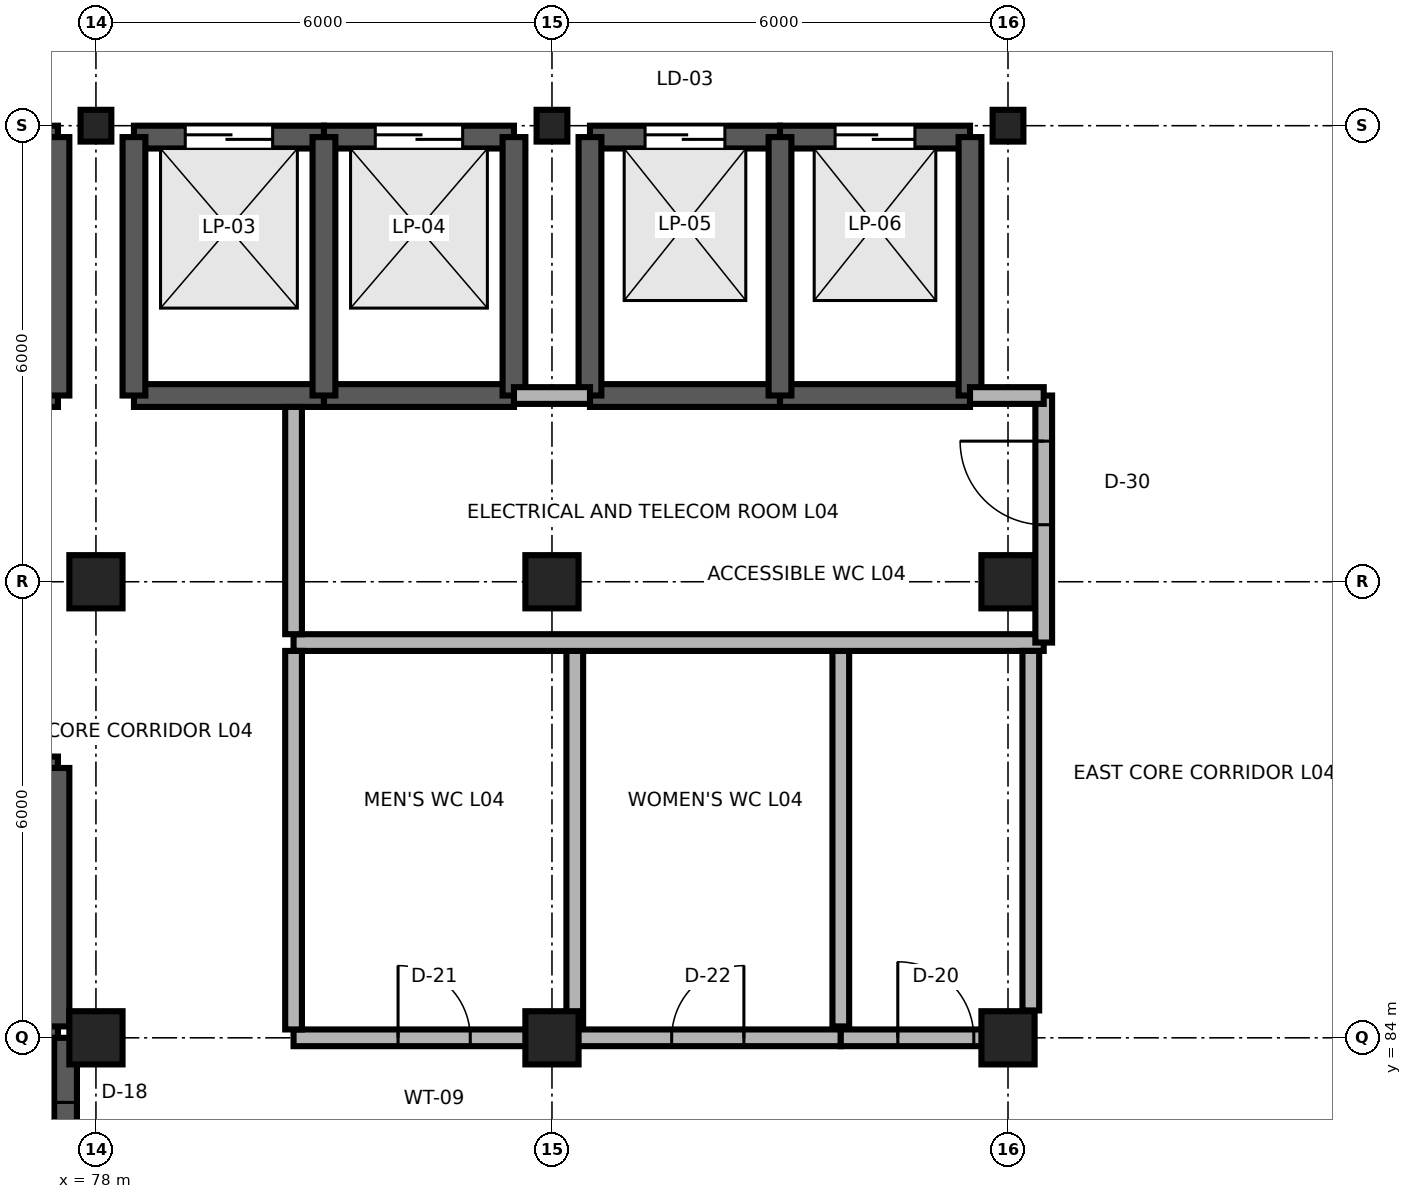
"""IFC4 building model, lengths in metres.
Left out: names, types, materials, properties, quantities, classifications, styles, units other than length and angle.
Written with IfcOpenShell. Run it as: python <this file> out.ifc"""

import sys

from ifc_helpers import new_model, si_unit, direction, frame, frame_2d, origin, origin_2d, place, context, subcontext, project, spatial, rectangle, i_section, extrude, element, fill, save


model = new_model("IFC4")
c1 = context("Model", 3, precision=1e-05, world=origin(), true_north=direction((0.0, 1.0)))
c2 = subcontext(c1, "Body", "Model", "MODEL_VIEW")
j1 = project(units=[si_unit("LENGTHUNIT", "METRE"), si_unit("PLANEANGLEUNIT", "RADIAN")], contexts=[c1])
p1 = place(None, origin())
s1 = spatial("IfcSite", under=j1, at=p1, CompositionType="ELEMENT")
p2 = place(p1, origin())
s2 = spatial("IfcBuilding", under=s1, at=p2, CompositionType="ELEMENT")
p3 = place(p2, frame((0.0, 0.0, 16.5)))
s3 = spatial("IfcBuildingStorey", under=s2, at=p3, CompositionType="ELEMENT", Elevation=16.5)
for number, where, z_axis, x_axis in (
    (1, (78.0, 84.0, 0.0), (0.0, 0.0, 1.0), (1.0, 0.0, 0.0)),
    (2, (84.0, 84.0, 0.0), (0.0, 0.0, 1.0), (1.0, 0.0, 0.0)),
    (3, (90.0, 84.0, 0.0), (0.0, 0.0, 1.0), (1.0, 0.0, 0.0)),
    (4, (78.0, 90.0, 0.0), (0.0, 0.0, 1.0), (1.0, 0.0, 0.0)),
    (5, (84.0, 90.0, 0.0), (0.0, 0.0, 1.0), (1.0, 0.0, 0.0)),
    (6, (90.0, 90.0, 0.0), (0.0, 0.0, 1.0), (1.0, 0.0, 0.0)),
):
    element("IfcColumn", number, at=place(p3, frame(where, z_axis=z_axis, x_axis=x_axis)), inside=s3, PredefinedType="COLUMN", context=c2, shape_type="SweptSolid", body=[
        extrude(rectangle(XDim=0.7, YDim=0.7, at=origin_2d()), origin(), (0.0, 0.0, 1.0), 4.5),
    ])
for number, where, z_axis, x_axis in (
    (7, (78.0, 96.0, 0.0), (0.0, 0.0, 1.0), (1.0, 0.0, 0.0)),
    (8, (84.0, 96.0, 0.0), (0.0, 0.0, 1.0), (1.0, 0.0, 0.0)),
    (9, (90.0, 96.0, 0.0), (0.0, 0.0, 1.0), (1.0, 0.0, 0.0)),
):
    element("IfcColumn", number, at=place(p3, frame(where, z_axis=z_axis, x_axis=x_axis)), inside=s3, PredefinedType="COLUMN", context=c2, shape_type="SweptSolid", body=[
        extrude(i_section(OverallWidth=0.405, OverallDepth=0.418, WebThickness=0.02, FlangeThickness=0.03, FilletRadius=0.022, at=origin_2d()), origin(), (0.0, 0.0, 1.0), 4.5),
    ])
p4 = place(p3, frame((75.0, 84.15, 0.0), z_axis=(0.0, 0.0, 1.0), x_axis=(1.0, 0.0, 0.0)))
e10 = element("IfcWall", 10, at=p4, inside=s3, PredefinedType="SHEAR", context=c2, shape_type="SweptSolid", body=[
    extrude(rectangle(XDim=2.5, YDim=0.3, at=frame_2d((1.25, 0.0))), origin(), (0.0, 0.0, 1.0), 4.34),
])
p5 = place(p4, frame((0.7, 0.0, 0.0)))
e11 = element("IfcOpeningElement", 11, at=p5, cuts=e10, PredefinedType="OPENING", context=c2, shape_type="SweptSolid", body=[
    extrude(rectangle(XDim=1.1, YDim=2.1, at=frame_2d((0.55, 1.05))), frame((0.0, 0.165, 0.0), z_axis=(0.0, -1.0, 0.0), x_axis=(1.0, 0.0, 0.0)), (0.0, 0.0, 1.0), 0.33),
])
p6 = place(p3, frame((75.0, 87.55, 0.0), z_axis=(0.0, 0.0, 1.0), x_axis=(1.0, 0.0, 0.0)))
e12 = element("IfcWall", 12, at=p6, inside=s3, PredefinedType="SHEAR", context=c2, shape_type="SweptSolid", body=[
    extrude(rectangle(XDim=2.5, YDim=0.3, at=frame_2d((1.25, 0.0))), origin(), (0.0, 0.0, 1.0), 4.34),
])
p7 = place(p3, frame((77.5, 84.15, 0.0), z_axis=(0.0, 0.0, 1.0), x_axis=(0.0, 1.0, 0.0)))
e13 = element("IfcWall", 13, at=p7, inside=s3, PredefinedType="SHEAR", context=c2, shape_type="SweptSolid", body=[
    extrude(rectangle(XDim=3.4, YDim=0.3, at=frame_2d((1.7, 0.0))), origin(), (0.0, 0.0, 1.0), 4.34),
])
p8 = place(p3, frame((75.0, 95.85, 0.0), z_axis=(0.0, 0.0, 1.0), x_axis=(1.0, 0.0, 0.0)))
e14 = element("IfcWall", 14, at=p8, inside=s3, PredefinedType="SHEAR", context=c2, shape_type="SweptSolid", body=[
    extrude(rectangle(XDim=2.5, YDim=0.3, at=frame_2d((1.25, 0.0))), origin(), (0.0, 0.0, 1.0), 4.34),
])
p9 = place(p8, frame((0.675, 0.0, 0.0)))
e15 = element("IfcOpeningElement", 15, at=p9, cuts=e14, PredefinedType="OPENING", context=c2, shape_type="SweptSolid", body=[
    extrude(rectangle(XDim=1.15, YDim=2.15, at=frame_2d((0.575, 1.075))), frame((0.0, 0.165, 0.0), z_axis=(0.0, -1.0, 0.0), x_axis=(1.0, 0.0, 0.0)), (0.0, 0.0, 1.0), 0.33),
])
p10 = place(p3, frame((75.0, 92.45, 0.0), z_axis=(0.0, 0.0, 1.0), x_axis=(1.0, 0.0, 0.0)))
e16 = element("IfcWall", 16, at=p10, inside=s3, PredefinedType="SHEAR", context=c2, shape_type="SweptSolid", body=[
    extrude(rectangle(XDim=2.5, YDim=0.3, at=frame_2d((1.25, 0.0))), origin(), (0.0, 0.0, 1.0), 4.34),
])
p11 = place(p3, frame((77.5, 92.45, 0.0), z_axis=(0.0, 0.0, 1.0), x_axis=(0.0, 1.0, 0.0)))
e17 = element("IfcWall", 17, at=p11, inside=s3, PredefinedType="SHEAR", context=c2, shape_type="SweptSolid", body=[
    extrude(rectangle(XDim=3.4, YDim=0.3, at=frame_2d((1.7, 0.0))), origin(), (0.0, 0.0, 1.0), 4.34),
])
p12 = place(p3, frame((78.5, 95.85, 0.0), z_axis=(0.0, 0.0, 1.0), x_axis=(1.0, 0.0, 0.0)))
e18 = element("IfcWall", 18, at=p12, inside=s3, PredefinedType="SHEAR", context=c2, shape_type="SweptSolid", body=[
    extrude(rectangle(XDim=2.5, YDim=0.3, at=frame_2d((1.25, 0.0))), origin(), (0.0, 0.0, 1.0), 4.34),
])
p13 = place(p12, frame((0.675, 0.0, 0.0)))
e19 = element("IfcOpeningElement", 19, at=p13, cuts=e18, PredefinedType="OPENING", context=c2, shape_type="SweptSolid", body=[
    extrude(rectangle(XDim=1.15, YDim=2.15, at=frame_2d((0.575, 1.075))), frame((0.0, 0.165, 0.0), z_axis=(0.0, -1.0, 0.0), x_axis=(1.0, 0.0, 0.0)), (0.0, 0.0, 1.0), 0.33),
])
p14 = place(p3, frame((78.5, 92.45, 0.0), z_axis=(0.0, 0.0, 1.0), x_axis=(1.0, 0.0, 0.0)))
e20 = element("IfcWall", 20, at=p14, inside=s3, PredefinedType="SHEAR", context=c2, shape_type="SweptSolid", body=[
    extrude(rectangle(XDim=2.5, YDim=0.3, at=frame_2d((1.25, 0.0))), origin(), (0.0, 0.0, 1.0), 4.34),
])
p15 = place(p3, frame((78.5, 92.45, 0.0), z_axis=(0.0, 0.0, 1.0), x_axis=(0.0, 1.0, 0.0)))
e21 = element("IfcWall", 21, at=p15, inside=s3, PredefinedType="SHEAR", context=c2, shape_type="SweptSolid", body=[
    extrude(rectangle(XDim=3.4, YDim=0.3, at=frame_2d((1.7, 0.0))), origin(), (0.0, 0.0, 1.0), 4.34),
])
p16 = place(p3, frame((81.0, 95.85, 0.0), z_axis=(0.0, 0.0, 1.0), x_axis=(1.0, 0.0, 0.0)))
e22 = element("IfcWall", 22, at=p16, inside=s3, PredefinedType="SHEAR", context=c2, shape_type="SweptSolid", body=[
    extrude(rectangle(XDim=2.5, YDim=0.3, at=frame_2d((1.25, 0.0))), origin(), (0.0, 0.0, 1.0), 4.34),
])
p17 = place(p16, frame((0.675, 0.0, 0.0)))
e23 = element("IfcOpeningElement", 23, at=p17, cuts=e22, PredefinedType="OPENING", context=c2, shape_type="SweptSolid", body=[
    extrude(rectangle(XDim=1.15, YDim=2.15, at=frame_2d((0.575, 1.075))), frame((0.0, 0.165, 0.0), z_axis=(0.0, -1.0, 0.0), x_axis=(1.0, 0.0, 0.0)), (0.0, 0.0, 1.0), 0.33),
])
p18 = place(p3, frame((81.0, 92.45, 0.0), z_axis=(0.0, 0.0, 1.0), x_axis=(1.0, 0.0, 0.0)))
e24 = element("IfcWall", 24, at=p18, inside=s3, PredefinedType="SHEAR", context=c2, shape_type="SweptSolid", body=[
    extrude(rectangle(XDim=2.5, YDim=0.3, at=frame_2d((1.25, 0.0))), origin(), (0.0, 0.0, 1.0), 4.34),
])
for number, where, z_axis, x_axis in (
    (25, (81.0, 92.45, 0.0), (0.0, 0.0, 1.0), (0.0, 1.0, 0.0)),
    (26, (83.5, 92.45, 0.0), (0.0, 0.0, 1.0), (0.0, 1.0, 0.0)),
):
    element("IfcWall", number, at=place(p3, frame(where, z_axis=z_axis, x_axis=x_axis)), inside=s3, PredefinedType="SHEAR", context=c2, shape_type="SweptSolid", body=[
        extrude(rectangle(XDim=3.4, YDim=0.3, at=frame_2d((1.7, 0.0))), origin(), (0.0, 0.0, 1.0), 4.34),
    ])
p19 = place(p3, frame((84.5, 95.85, 0.0), z_axis=(0.0, 0.0, 1.0), x_axis=(1.0, 0.0, 0.0)))
e27 = element("IfcWall", 27, at=p19, inside=s3, PredefinedType="SHEAR", context=c2, shape_type="SweptSolid", body=[
    extrude(rectangle(XDim=2.5, YDim=0.3, at=frame_2d((1.25, 0.0))), origin(), (0.0, 0.0, 1.0), 4.34),
])
p20 = place(p19, frame((0.725, 0.0, 0.0)))
e28 = element("IfcOpeningElement", 28, at=p20, cuts=e27, PredefinedType="OPENING", context=c2, shape_type="SweptSolid", body=[
    extrude(rectangle(XDim=1.05, YDim=2.1, at=frame_2d((0.525, 1.05))), frame((0.0, 0.165, 0.0), z_axis=(0.0, -1.0, 0.0), x_axis=(1.0, 0.0, 0.0)), (0.0, 0.0, 1.0), 0.33),
])
p21 = place(p3, frame((84.5, 92.45, 0.0), z_axis=(0.0, 0.0, 1.0), x_axis=(1.0, 0.0, 0.0)))
e29 = element("IfcWall", 29, at=p21, inside=s3, PredefinedType="SHEAR", context=c2, shape_type="SweptSolid", body=[
    extrude(rectangle(XDim=2.5, YDim=0.3, at=frame_2d((1.25, 0.0))), origin(), (0.0, 0.0, 1.0), 4.34),
])
p22 = place(p3, frame((84.5, 92.45, 0.0), z_axis=(0.0, 0.0, 1.0), x_axis=(0.0, 1.0, 0.0)))
e30 = element("IfcWall", 30, at=p22, inside=s3, PredefinedType="SHEAR", context=c2, shape_type="SweptSolid", body=[
    extrude(rectangle(XDim=3.4, YDim=0.3, at=frame_2d((1.7, 0.0))), origin(), (0.0, 0.0, 1.0), 4.34),
])
p23 = place(p3, frame((87.0, 95.85, 0.0), z_axis=(0.0, 0.0, 1.0), x_axis=(1.0, 0.0, 0.0)))
e31 = element("IfcWall", 31, at=p23, inside=s3, PredefinedType="SHEAR", context=c2, shape_type="SweptSolid", body=[
    extrude(rectangle(XDim=2.5, YDim=0.3, at=frame_2d((1.25, 0.0))), origin(), (0.0, 0.0, 1.0), 4.34),
])
p24 = place(p23, frame((0.725, 0.0, 0.0)))
e32 = element("IfcOpeningElement", 32, at=p24, cuts=e31, PredefinedType="OPENING", context=c2, shape_type="SweptSolid", body=[
    extrude(rectangle(XDim=1.05, YDim=2.1, at=frame_2d((0.525, 1.05))), frame((0.0, 0.165, 0.0), z_axis=(0.0, -1.0, 0.0), x_axis=(1.0, 0.0, 0.0)), (0.0, 0.0, 1.0), 0.33),
])
p25 = place(p3, frame((87.0, 92.45, 0.0), z_axis=(0.0, 0.0, 1.0), x_axis=(1.0, 0.0, 0.0)))
e33 = element("IfcWall", 33, at=p25, inside=s3, PredefinedType="SHEAR", context=c2, shape_type="SweptSolid", body=[
    extrude(rectangle(XDim=2.5, YDim=0.3, at=frame_2d((1.25, 0.0))), origin(), (0.0, 0.0, 1.0), 4.34),
])
for number, where, z_axis, x_axis in (
    (34, (87.0, 92.45, 0.0), (0.0, 0.0, 1.0), (0.0, 1.0, 0.0)),
    (35, (89.5, 92.45, 0.0), (0.0, 0.0, 1.0), (0.0, 1.0, 0.0)),
):
    element("IfcWall", number, at=place(p3, frame(where, z_axis=z_axis, x_axis=x_axis)), inside=s3, PredefinedType="SHEAR", context=c2, shape_type="SweptSolid", body=[
        extrude(rectangle(XDim=3.4, YDim=0.3, at=frame_2d((1.7, 0.0))), origin(), (0.0, 0.0, 1.0), 4.34),
    ])
p26 = place(p3, frame((77.6, 81.0, 0.0), z_axis=(0.0, 0.0, 1.0), x_axis=(0.0, 1.0, 0.0)))
e36 = element("IfcWall", 36, at=p26, inside=s3, PredefinedType="SHEAR", context=c2, shape_type="SweptSolid", body=[
    extrude(rectangle(XDim=3.0, YDim=0.3, at=frame_2d((1.5, 0.0))), origin(), (0.0, 0.0, 1.0), 4.0),
])
p27 = place(p26, frame((0.85, 0.0, 0.0)))
e37 = element("IfcOpeningElement", 37, at=p27, cuts=e36, PredefinedType="OPENING", context=c2, shape_type="SweptSolid", body=[
    extrude(rectangle(XDim=1.3, YDim=2.2, at=frame_2d((0.65, 1.1))), frame((0.0, 0.165, 0.0), z_axis=(0.0, -1.0, 0.0), x_axis=(1.0, 0.0, 0.0)), (0.0, 0.0, 1.0), 0.33),
])
p28 = place(p3, frame((80.6, 84.0, 0.0), z_axis=(0.0, 0.0, 1.0), x_axis=(1.0, 0.0, 0.0)))
e38 = element("IfcWall", 38, at=p28, inside=s3, PredefinedType="PARTITIONING", context=c2, shape_type="SweptSolid", body=[
    extrude(rectangle(XDim=3.7, YDim=0.22, at=frame_2d((1.85, 0.0))), origin(), (0.0, 0.0, 1.0), 3.9),
])
p29 = place(p28, frame((1.375, 0.0, 0.0)))
e39 = element("IfcOpeningElement", 39, at=p29, cuts=e38, PredefinedType="OPENING", context=c2, shape_type="SweptSolid", body=[
    extrude(rectangle(XDim=0.95, YDim=2.15, at=frame_2d((0.475, 1.075))), frame((0.0, 0.125, 0.0), z_axis=(0.0, -1.0, 0.0), x_axis=(1.0, 0.0, 0.0)), (0.0, 0.0, 1.0), 0.25),
])
p30 = place(p3, frame((84.3, 84.0, 0.0), z_axis=(0.0, 0.0, 1.0), x_axis=(1.0, 0.0, 0.0)))
e40 = element("IfcWall", 40, at=p30, inside=s3, PredefinedType="PARTITIONING", context=c2, shape_type="SweptSolid", body=[
    extrude(rectangle(XDim=3.5, YDim=0.22, at=frame_2d((1.75, 0.0))), origin(), (0.0, 0.0, 1.0), 3.9),
])
p31 = place(p30, frame((1.275, 0.0, 0.0)))
e41 = element("IfcOpeningElement", 41, at=p31, cuts=e40, PredefinedType="OPENING", context=c2, shape_type="SweptSolid", body=[
    extrude(rectangle(XDim=0.95, YDim=2.1, at=frame_2d((0.475, 1.05))), frame((0.0, 0.125, 0.0), z_axis=(0.0, -1.0, 0.0), x_axis=(1.0, 0.0, 0.0)), (0.0, 0.0, 1.0), 0.25),
])
p32 = place(p3, frame((87.8, 84.0, 0.0), z_axis=(0.0, 0.0, 1.0), x_axis=(1.0, 0.0, 0.0)))
e42 = element("IfcWall", 42, at=p32, inside=s3, PredefinedType="PARTITIONING", context=c2, shape_type="SweptSolid", body=[
    extrude(rectangle(XDim=2.5, YDim=0.22, at=frame_2d((1.25, 0.0))), origin(), (0.0, 0.0, 1.0), 3.9),
])
p33 = place(p32, frame((0.75, 0.0, 0.0)))
e43 = element("IfcOpeningElement", 43, at=p33, cuts=e42, PredefinedType="OPENING", context=c2, shape_type="SweptSolid", body=[
    extrude(rectangle(XDim=1.0, YDim=2.15, at=frame_2d((0.5, 1.075))), frame((0.0, 0.125, 0.0), z_axis=(0.0, -1.0, 0.0), x_axis=(1.0, 0.0, 0.0)), (0.0, 0.0, 1.0), 0.25),
])
for number, where, z_axis, x_axis in (
    (44, (84.3, 84.15, 0.0), (0.0, 0.0, 1.0), (0.0, 1.0, 0.0)),
    (45, (87.8, 84.15, 0.0), (0.0, 0.0, 1.0), (0.0, 1.0, 0.0)),
):
    element("IfcWall", number, at=place(p3, frame(where, z_axis=z_axis, x_axis=x_axis)), inside=s3, PredefinedType="PARTITIONING", context=c2, shape_type="SweptSolid", body=[
        extrude(rectangle(XDim=5.0, YDim=0.22, at=frame_2d((2.5, 0.0))), origin(), (0.0, 0.0, 1.0), 4.0),
    ])
p34 = place(p3, frame((80.6, 89.2, 0.0), z_axis=(0.0, 0.0, 1.0), x_axis=(1.0, 0.0, 0.0)))
e46 = element("IfcWall", 46, at=p34, inside=s3, PredefinedType="PARTITIONING", context=c2, shape_type="SweptSolid", body=[
    extrude(rectangle(XDim=9.87, YDim=0.22, at=frame_2d((4.935, 0.0))), origin(), (0.0, 0.0, 1.0), 4.0),
])
p35 = place(p3, frame((90.47, 89.2, 0.0), z_axis=(0.0, 0.0, 1.0), x_axis=(0.0, 1.0, 0.0)))
e47 = element("IfcWall", 47, at=p35, inside=s3, PredefinedType="PARTITIONING", context=c2, shape_type="SweptSolid", body=[
    extrude(rectangle(XDim=3.25, YDim=0.22, at=frame_2d((1.625, 0.0))), origin(), (0.0, 0.0, 1.0), 4.0),
])
p36 = place(p35, frame((1.55, 0.0, 0.0)))
e48 = element("IfcOpeningElement", 48, at=p36, cuts=e47, PredefinedType="OPENING", context=c2, shape_type="SweptSolid", body=[
    extrude(rectangle(XDim=1.1, YDim=2.15, at=frame_2d((0.55, 1.075))), frame((0.0, 0.125, 0.0), z_axis=(0.0, -1.0, 0.0), x_axis=(1.0, 0.0, 0.0)), (0.0, 0.0, 1.0), 0.25),
])
p37 = place(p3, frame((80.6, 84.11, 0.0), z_axis=(0.0, 0.0, 1.0), x_axis=(0.0, 1.0, 0.0)))
e49 = element("IfcWall", 49, at=p37, inside=s3, PredefinedType="PARTITIONING", context=c2, shape_type="SweptSolid", body=[
    extrude(rectangle(XDim=4.98, YDim=0.22, at=frame_2d((2.49, 0.0))), origin(), (0.0, 0.0, 1.0), 4.0),
])
p38 = place(p3, frame((90.3, 84.36, 0.0), z_axis=(0.0, 0.0, 1.0), x_axis=(0.0, 1.0, 0.0)))
e50 = element("IfcWall", 50, at=p38, inside=s3, PredefinedType="PARTITIONING", context=c2, shape_type="SweptSolid", body=[
    extrude(rectangle(XDim=4.73, YDim=0.22, at=frame_2d((2.365, 0.0))), origin(), (0.0, 0.0, 1.0), 4.0),
])
p39 = place(p3, frame((80.6, 89.31, 0.0), z_axis=(0.0, 0.0, 1.0), x_axis=(0.0, 1.0, 0.0)))
e51 = element("IfcWall", 51, at=p39, inside=s3, PredefinedType="PARTITIONING", context=c2, shape_type="SweptSolid", body=[
    extrude(rectangle(XDim=2.99, YDim=0.22, at=frame_2d((1.495, 0.0))), origin(), (0.0, 0.0, 1.0), 4.0),
])
p40 = place(p3, frame((83.5, 92.45, 0.0), z_axis=(0.0, 0.0, 1.0), x_axis=(1.0, 0.0, 0.0)))
e52 = element("IfcWall", 52, at=p40, inside=s3, PredefinedType="PARTITIONING", context=c2, shape_type="SweptSolid", body=[
    extrude(rectangle(XDim=1.0, YDim=0.22, at=frame_2d((0.5, 0.0))), origin(), (0.0, 0.0, 1.0), 4.0),
])
p41 = place(p3, frame((89.5, 92.45, 0.0), z_axis=(0.0, 0.0, 1.0), x_axis=(1.0, 0.0, 0.0)))
e53 = element("IfcWall", 53, at=p41, inside=s3, PredefinedType="PARTITIONING", context=c2, shape_type="SweptSolid", body=[
    extrude(rectangle(XDim=0.97, YDim=0.22, at=frame_2d((0.485, 0.0))), origin(), (0.0, 0.0, 1.0), 4.0),
])
p42 = place(p13, origin())
e54 = element("IfcDoor", 54, at=p42, inside=s3, OperationType="DOUBLE_DOOR_SLIDING", PredefinedType="DOOR", context=c2, shape_type="SweptSolid", body=[
    extrude(rectangle(XDim=1.15, YDim=2.15, at=frame_2d((0.575, 1.075))), frame((0.0, 0.025, 0.0), z_axis=(0.0, -1.0, 0.0), x_axis=(1.0, 0.0, 0.0)), (0.0, 0.0, 1.0), 0.05),
])
fill(e19, e54)
p43 = place(p17, origin())
e55 = element("IfcDoor", 55, at=p43, inside=s3, OperationType="DOUBLE_DOOR_SLIDING", PredefinedType="DOOR", context=c2, shape_type="SweptSolid", body=[
    extrude(rectangle(XDim=1.15, YDim=2.15, at=frame_2d((0.575, 1.075))), frame((0.0, 0.025, 0.0), z_axis=(0.0, -1.0, 0.0), x_axis=(1.0, 0.0, 0.0)), (0.0, 0.0, 1.0), 0.05),
])
fill(e23, e55)
p44 = place(p20, origin())
e56 = element("IfcDoor", 56, at=p44, inside=s3, OperationType="DOUBLE_DOOR_SLIDING", PredefinedType="DOOR", context=c2, shape_type="SweptSolid", body=[
    extrude(rectangle(XDim=1.05, YDim=2.1, at=frame_2d((0.525, 1.05))), frame((0.0, 0.025, 0.0), z_axis=(0.0, -1.0, 0.0), x_axis=(1.0, 0.0, 0.0)), (0.0, 0.0, 1.0), 0.05),
])
fill(e28, e56)
p45 = place(p24, origin())
e57 = element("IfcDoor", 57, at=p45, inside=s3, OperationType="DOUBLE_DOOR_SLIDING", PredefinedType="DOOR", context=c2, shape_type="SweptSolid", body=[
    extrude(rectangle(XDim=1.05, YDim=2.1, at=frame_2d((0.525, 1.05))), frame((0.0, 0.025, 0.0), z_axis=(0.0, -1.0, 0.0), x_axis=(1.0, 0.0, 0.0)), (0.0, 0.0, 1.0), 0.05),
])
fill(e32, e57)
p46 = place(p27, origin())
e58 = element("IfcDoor", 58, at=p46, inside=s3, OperationType="SINGLE_SWING_RIGHT", PredefinedType="DOOR", context=c2, shape_type="SweptSolid", body=[
    extrude(rectangle(XDim=1.3, YDim=2.2, at=frame_2d((0.65, 1.1))), frame((0.0, 0.025, 0.0), z_axis=(0.0, -1.0, 0.0), x_axis=(1.0, 0.0, 0.0)), (0.0, 0.0, 1.0), 0.05),
])
fill(e37, e58)
p47 = place(p29, origin())
e59 = element("IfcDoor", 59, at=p47, inside=s3, OperationType="SINGLE_SWING_LEFT", PredefinedType="DOOR", context=c2, shape_type="SweptSolid", body=[
    extrude(rectangle(XDim=0.95, YDim=2.15, at=frame_2d((0.475, 1.075))), frame((0.0, 0.025, 0.0), z_axis=(0.0, -1.0, 0.0), x_axis=(1.0, 0.0, 0.0)), (0.0, 0.0, 1.0), 0.05),
])
fill(e39, e59)
p48 = place(p31, origin())
e60 = element("IfcDoor", 60, at=p48, inside=s3, OperationType="SINGLE_SWING_RIGHT", PredefinedType="DOOR", context=c2, shape_type="SweptSolid", body=[
    extrude(rectangle(XDim=0.95, YDim=2.1, at=frame_2d((0.475, 1.05))), frame((0.0, 0.025, 0.0), z_axis=(0.0, -1.0, 0.0), x_axis=(1.0, 0.0, 0.0)), (0.0, 0.0, 1.0), 0.05),
])
fill(e41, e60)
p49 = place(p33, origin())
e61 = element("IfcDoor", 61, at=p49, inside=s3, OperationType="SINGLE_SWING_LEFT", PredefinedType="DOOR", context=c2, shape_type="SweptSolid", body=[
    extrude(rectangle(XDim=1.0, YDim=2.15, at=frame_2d((0.5, 1.075))), frame((0.0, 0.025, 0.0), z_axis=(0.0, -1.0, 0.0), x_axis=(1.0, 0.0, 0.0)), (0.0, 0.0, 1.0), 0.05),
])
fill(e43, e61)
p50 = place(p36, origin())
e62 = element("IfcDoor", 62, at=p50, inside=s3, OperationType="SINGLE_SWING_RIGHT", PredefinedType="DOOR", context=c2, shape_type="SweptSolid", body=[
    extrude(rectangle(XDim=1.1, YDim=2.15, at=frame_2d((0.55, 1.075))), frame((0.0, 0.025, 0.0), z_axis=(0.0, -1.0, 0.0), x_axis=(1.0, 0.0, 0.0)), (0.0, 0.0, 1.0), 0.05),
])
fill(e48, e62)
save(model, sys.argv[1])
